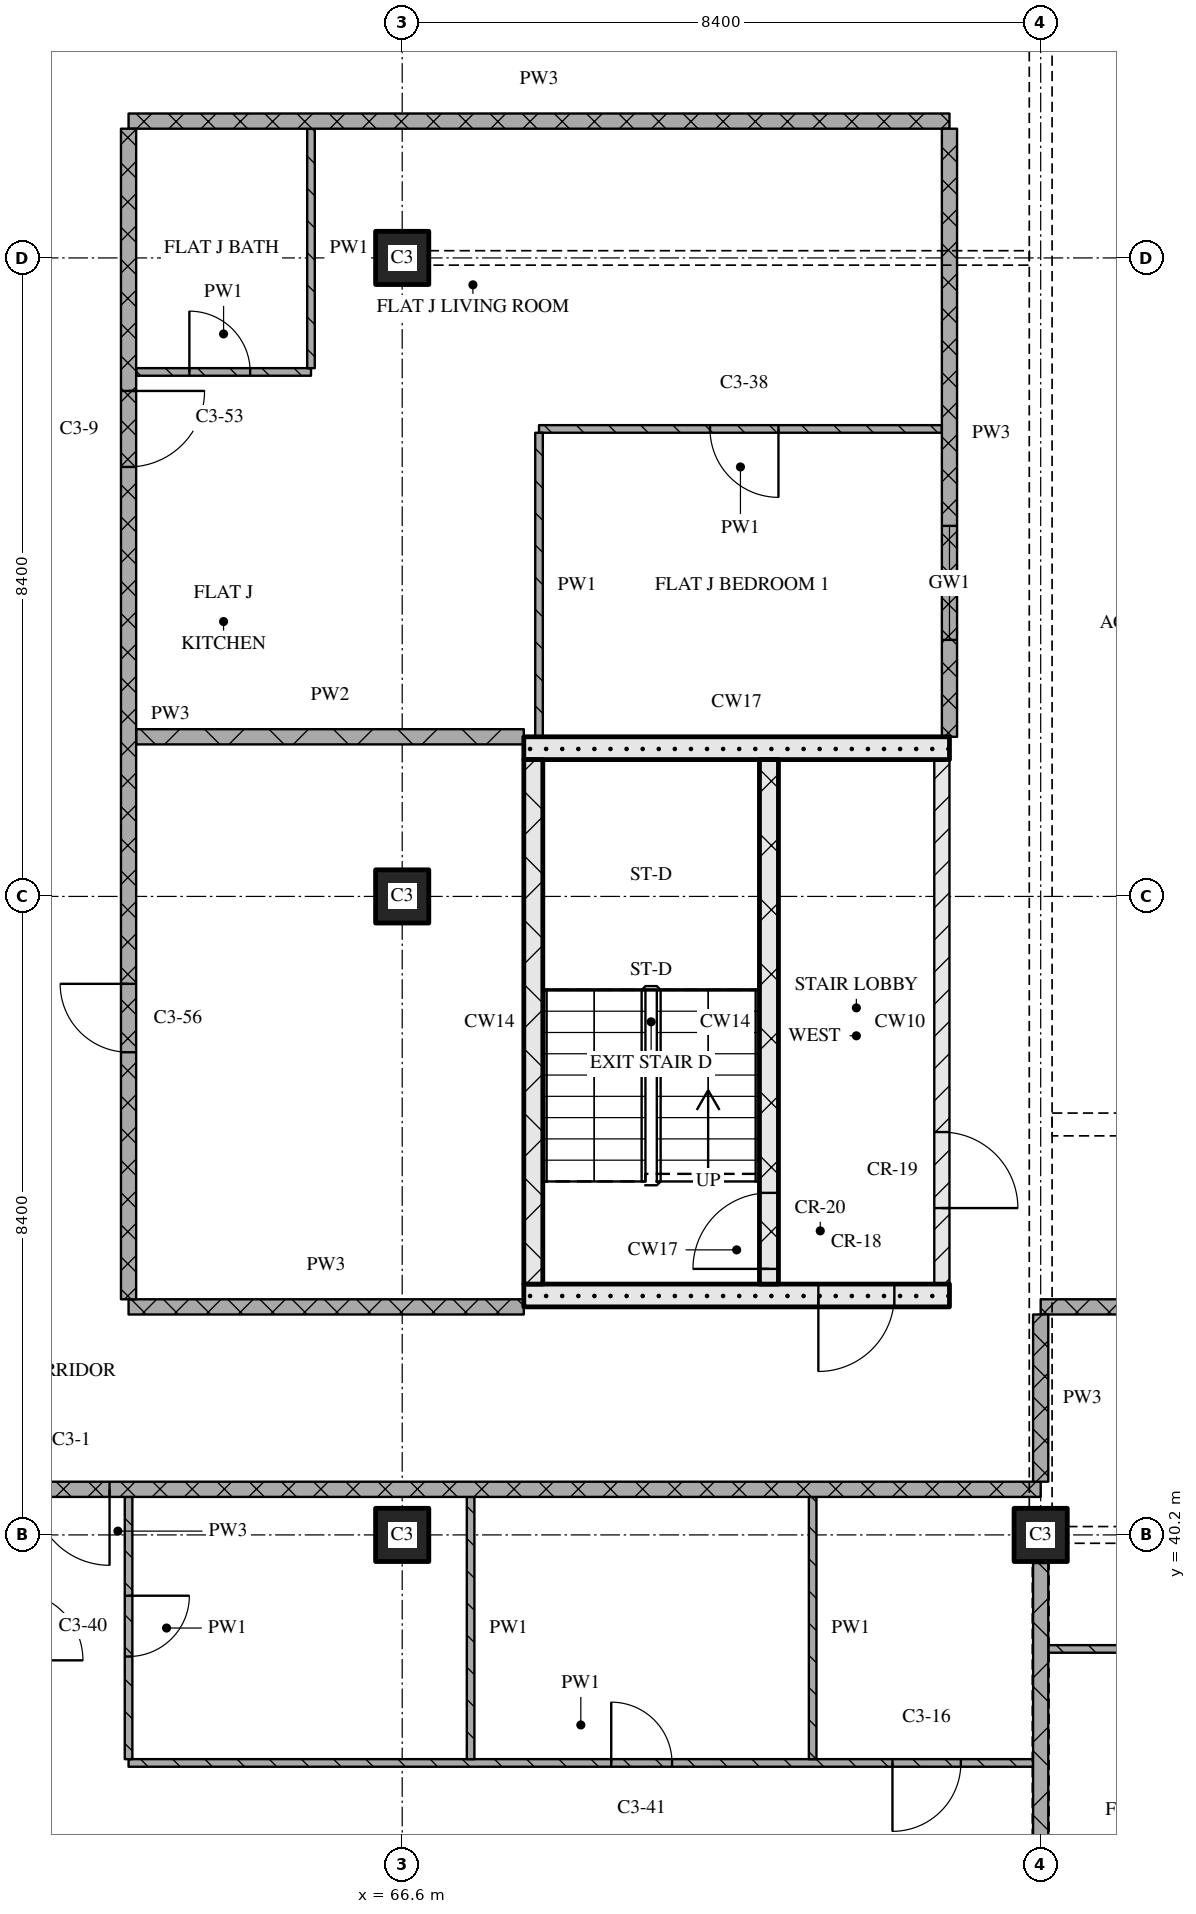
"""IFC4 building model, lengths in metres.
Left out: names, types, materials, properties, quantities, classifications, styles, units other than length and angle.
Written with IfcOpenShell. Run it as: python <this file> out.ifc"""

import sys

from ifc_helpers import new_model, si_unit, direction, frame, frame_2d, origin, origin_2d, place, context, subcontext, project, spatial, rectangle, extrude, element, fill, save


model = new_model("IFC4")
c1 = context("Model", 3, precision=1e-05, world=origin(), true_north=direction((0.0, 1.0)))
c2 = subcontext(c1, "Body", "Model", "MODEL_VIEW")
j1 = project(units=[si_unit("LENGTHUNIT", "METRE"), si_unit("PLANEANGLEUNIT", "RADIAN")], contexts=[c1])
p1 = place(None, origin())
s1 = spatial("IfcSite", under=j1, at=p1, CompositionType="ELEMENT")
p2 = place(p1, origin())
s2 = spatial("IfcBuilding", under=s1, at=p2, CompositionType="ELEMENT")
p3 = place(p2, frame((0.0, 0.0, 169.05)))
s3 = spatial("IfcBuildingStorey", under=s2, at=p3, CompositionType="ELEMENT", Elevation=169.05)
for number, where, z_axis, x_axis in (
    (1, (66.6, 40.2, 0.0), (0.0, 0.0, 1.0), (1.0, 0.0, 0.0)),
    (2, (66.6, 48.6, 0.0), (0.0, 0.0, 1.0), (1.0, 0.0, 0.0)),
    (3, (66.6, 57.0, 0.0), (0.0, 0.0, 1.0), (1.0, 0.0, 0.0)),
    (4, (75.0, 40.2, 0.0), (0.0, 0.0, 1.0), (1.0, 0.0, 0.0)),
):
    element("IfcColumn", number, at=place(p3, frame(where, z_axis=z_axis, x_axis=x_axis)), inside=s3, PredefinedType="COLUMN", context=c2, shape_type="SweptSolid", body=[
        extrude(rectangle(XDim=0.7, YDim=0.7, at=origin_2d()), origin(), (0.0, 0.0, 1.0), 3.6),
    ])
p4 = place(p3, frame((68.2, 43.35, 0.0), z_axis=(0.0, 0.0, 1.0), x_axis=(1.0, 0.0, 0.0)))
e5 = element("IfcWall", 5, at=p4, inside=s3, PredefinedType="SOLIDWALL", context=c2, shape_type="SweptSolid", body=[
    extrude(rectangle(XDim=5.6, YDim=0.3, at=frame_2d((2.8, 0.0))), origin(), (0.0, 0.0, 1.0), 3.32),
])
p5 = place(p4, frame((3.875, 0.0, 0.0)))
e6 = element("IfcOpeningElement", 6, at=p5, cuts=e5, PredefinedType="OPENING", context=c2, shape_type="SweptSolid", body=[
    extrude(rectangle(XDim=1.0, YDim=2.1, at=frame_2d((0.5, 1.05))), frame((0.0, 0.16, 0.0), z_axis=(0.0, -1.0, 0.0), x_axis=(1.0, 0.0, 0.0)), (0.0, 0.0, 1.0), 0.32),
])
p6 = place(p3, frame((68.325, 43.5, 0.0), z_axis=(0.0, 0.0, 1.0), x_axis=(0.0, 1.0, 0.0)))
e7 = element("IfcWall", 7, at=p6, inside=s3, PredefinedType="SOLIDWALL", context=c2, shape_type="SweptSolid", body=[
    extrude(rectangle(XDim=6.9, YDim=0.25, at=frame_2d((3.45, 0.0))), origin(), (0.0, 0.0, 1.0), 3.32),
])
p7 = place(p3, frame((71.425, 43.5, 0.0), z_axis=(0.0, 0.0, 1.0), x_axis=(0.0, 1.0, 0.0)))
e8 = element("IfcWall", 8, at=p7, inside=s3, PredefinedType="SOLIDWALL", context=c2, shape_type="SweptSolid", body=[
    extrude(rectangle(XDim=6.9, YDim=0.25, at=frame_2d((3.45, 0.0))), origin(), (0.0, 0.0, 1.0), 3.32),
])
p8 = place(p7, frame((0.2, 0.0, 0.0)))
e9 = element("IfcOpeningElement", 9, at=p8, cuts=e8, PredefinedType="OPENING", context=c2, shape_type="SweptSolid", body=[
    extrude(rectangle(XDim=1.0, YDim=2.1, at=frame_2d((0.5, 1.05))), frame((0.0, 0.135, 0.0), z_axis=(0.0, -1.0, 0.0), x_axis=(1.0, 0.0, 0.0)), (0.0, 0.0, 1.0), 0.27),
])
p9 = place(p3, frame((73.7, 43.5, 0.0), z_axis=(0.0, 0.0, 1.0), x_axis=(0.0, 1.0, 0.0)))
e10 = element("IfcWall", 10, at=p9, inside=s3, PredefinedType="PARTITIONING", context=c2, shape_type="SweptSolid", body=[
    extrude(rectangle(XDim=6.9, YDim=0.2, at=frame_2d((3.45, 0.0))), origin(), (0.0, 0.0, 1.0), 3.32),
])
p10 = place(p9, frame((1.0, 0.0, 0.0)))
e11 = element("IfcOpeningElement", 11, at=p10, cuts=e10, PredefinedType="OPENING", context=c2, shape_type="SweptSolid", body=[
    extrude(rectangle(XDim=1.0, YDim=2.1, at=frame_2d((0.5, 1.05))), frame((0.0, 0.11, 0.0), z_axis=(0.0, -1.0, 0.0), x_axis=(1.0, 0.0, 0.0)), (0.0, 0.0, 1.0), 0.22),
])
p11 = place(p3, frame((68.2, 50.55, 0.0), z_axis=(0.0, 0.0, 1.0), x_axis=(1.0, 0.0, 0.0)))
e12 = element("IfcWall", 12, at=p11, inside=s3, PredefinedType="SOLIDWALL", context=c2, shape_type="SweptSolid", body=[
    extrude(rectangle(XDim=5.6, YDim=0.3, at=frame_2d((2.8, 0.0))), origin(), (0.0, 0.0, 1.0), 3.32),
])
p12 = place(p3, frame((63.0, 37.2, 0.0), z_axis=(0.0, 0.0, 1.0), x_axis=(1.0, 0.0, 0.0)))
e13 = element("IfcWall", 13, at=p12, inside=s3, PredefinedType="PARTITIONING", context=c2, shape_type="SweptSolid", body=[
    extrude(rectangle(XDim=11.9, YDim=0.1, at=frame_2d((5.95, 0.0))), origin(), (0.0, 0.0, 1.0), 3.32),
])
p13 = place(p12, frame((6.35, 0.0, 0.0)))
e14 = element("IfcOpeningElement", 14, at=p13, cuts=e13, PredefinedType="OPENING", context=c2, shape_type="SweptSolid", body=[
    extrude(rectangle(XDim=0.8, YDim=2.1, at=frame_2d((0.4, 1.05))), frame((0.0, 0.06, 0.0), z_axis=(0.0, -1.0, 0.0), x_axis=(1.0, 0.0, 0.0)), (0.0, 0.0, 1.0), 0.12),
])
p14 = place(p12, frame((10.05, 0.0, 0.0)))
e15 = element("IfcOpeningElement", 15, at=p14, cuts=e13, PredefinedType="OPENING", context=c2, shape_type="SweptSolid", body=[
    extrude(rectangle(XDim=0.9, YDim=2.1, at=frame_2d((0.45, 1.05))), frame((0.0, 0.06, 0.0), z_axis=(0.0, -1.0, 0.0), x_axis=(1.0, 0.0, 0.0)), (0.0, 0.0, 1.0), 0.12),
])
p15 = place(p3, frame((75.1, 38.7, 0.0), z_axis=(0.0, 0.0, 1.0), x_axis=(1.0, 0.0, 0.0)))
e16 = element("IfcWall", 16, at=p15, inside=s3, PredefinedType="PARTITIONING", context=c2, shape_type="SweptSolid", body=[
    extrude(rectangle(XDim=6.8, YDim=0.1, at=frame_2d((3.4, 0.0))), origin(), (0.0, 0.0, 1.0), 3.32),
])
p16 = place(p15, frame((1.75, 0.0, 0.0)))
e17 = element("IfcOpeningElement", 17, at=p16, cuts=e16, PredefinedType="OPENING", context=c2, shape_type="SweptSolid", body=[
    extrude(rectangle(XDim=0.8, YDim=2.1, at=frame_2d((0.4, 1.05))), frame((0.0, 0.06, 0.0), z_axis=(0.0, -1.0, 0.0), x_axis=(1.0, 0.0, 0.0)), (0.0, 0.0, 1.0), 0.12),
])
p17 = place(p15, frame((5.2, 0.0, 0.0)))
e18 = element("IfcOpeningElement", 18, at=p17, cuts=e16, PredefinedType="OPENING", context=c2, shape_type="SweptSolid", body=[
    extrude(rectangle(XDim=0.8, YDim=2.1, at=frame_2d((0.4, 1.05))), frame((0.0, 0.06, 0.0), z_axis=(0.0, -1.0, 0.0), x_axis=(1.0, 0.0, 0.0)), (0.0, 0.0, 1.0), 0.12),
])
p18 = place(p3, frame((75.0, 40.8, 0.0), z_axis=(0.0, 0.0, 1.0), x_axis=(-1.0, 0.0, 0.0)))
e19 = element("IfcWall", 19, at=p18, inside=s3, PredefinedType="PARTITIONING", context=c2, shape_type="SweptSolid", body=[
    extrude(rectangle(XDim=24.28, YDim=0.2, at=frame_2d((12.14, 0.0))), origin(), (0.0, 0.0, 1.0), 3.32),
])
p19 = place(p18, frame((12.25, 0.0, 0.0)))
e20 = element("IfcOpeningElement", 20, at=p19, cuts=e19, PredefinedType="OPENING", context=c2, shape_type="SweptSolid", body=[
    extrude(rectangle(XDim=1.0, YDim=2.1, at=frame_2d((0.5, 1.05))), frame((0.0, 0.11, 0.0), z_axis=(0.0, -1.0, 0.0), x_axis=(1.0, 0.0, 0.0)), (0.0, 0.0, 1.0), 0.22),
])
p20 = place(p3, frame((63.0, 43.2, 0.0), z_axis=(0.0, 0.0, 1.0), x_axis=(1.0, 0.0, 0.0)))
e21 = element("IfcWall", 21, at=p20, inside=s3, PredefinedType="PARTITIONING", context=c2, shape_type="SweptSolid", body=[
    extrude(rectangle(XDim=5.2, YDim=0.2, at=frame_2d((2.6, 0.0))), origin(), (0.0, 0.0, 1.0), 3.32),
])
p21 = place(p3, frame((100.2, 43.2, 0.0), z_axis=(0.0, 0.0, 1.0), x_axis=(-1.0, 0.0, 0.0)))
e22 = element("IfcWall", 22, at=p21, inside=s3, PredefinedType="PARTITIONING", context=c2, shape_type="SweptSolid", body=[
    extrude(rectangle(XDim=25.2, YDim=0.2, at=frame_2d((12.6, 0.0))), origin(), (0.0, 0.0, 1.0), 3.32),
])
p22 = place(p21, frame((4.45, 0.0, 0.0)))
e23 = element("IfcOpeningElement", 23, at=p22, cuts=e22, PredefinedType="OPENING", context=c2, shape_type="SweptSolid", body=[
    extrude(rectangle(XDim=1.0, YDim=2.1, at=frame_2d((0.5, 1.05))), frame((0.0, 0.11, 0.0), z_axis=(0.0, -1.0, 0.0), x_axis=(1.0, 0.0, 0.0)), (0.0, 0.0, 1.0), 0.22),
])
p23 = place(p21, frame((17.05, 0.0, 0.0)))
e24 = element("IfcOpeningElement", 24, at=p23, cuts=e22, PredefinedType="OPENING", context=c2, shape_type="SweptSolid", body=[
    extrude(rectangle(XDim=1.0, YDim=2.1, at=frame_2d((0.5, 1.05))), frame((0.0, 0.11, 0.0), z_axis=(0.0, -1.0, 0.0), x_axis=(1.0, 0.0, 0.0)), (0.0, 0.0, 1.0), 0.22),
])
p24 = place(p3, frame((63.1, 50.7, 0.0), z_axis=(0.0, 0.0, 1.0), x_axis=(1.0, 0.0, 0.0)))
e25 = element("IfcWall", 25, at=p24, inside=s3, PredefinedType="PARTITIONING", context=c2, shape_type="SweptSolid", body=[
    extrude(rectangle(XDim=5.1, YDim=0.2, at=frame_2d((2.55, 0.0))), origin(), (0.0, 0.0, 1.0), 3.32),
])
p25 = place(p3, frame((73.7, 54.75, 0.0), z_axis=(0.0, 0.0, 1.0), x_axis=(-1.0, 0.0, 0.0)))
e26 = element("IfcWall", 26, at=p25, inside=s3, PredefinedType="PARTITIONING", context=c2, shape_type="SweptSolid", body=[
    extrude(rectangle(XDim=5.3, YDim=0.1, at=frame_2d((2.65, 0.0))), origin(), (0.0, 0.0, 1.0), 3.32),
])
p26 = place(p25, frame((2.15, 0.0, 0.0)))
e27 = element("IfcOpeningElement", 27, at=p26, cuts=e26, PredefinedType="OPENING", context=c2, shape_type="SweptSolid", body=[
    extrude(rectangle(XDim=0.9, YDim=2.1, at=frame_2d((0.45, 1.05))), frame((0.0, 0.06, 0.0), z_axis=(0.0, -1.0, 0.0), x_axis=(1.0, 0.0, 0.0)), (0.0, 0.0, 1.0), 0.12),
])
p27 = place(p3, frame((63.1, 55.5, 0.0), z_axis=(0.0, 0.0, 1.0), x_axis=(1.0, 0.0, 0.0)))
e28 = element("IfcWall", 28, at=p27, inside=s3, PredefinedType="PARTITIONING", context=c2, shape_type="SweptSolid", body=[
    extrude(rectangle(XDim=2.3, YDim=0.1, at=frame_2d((1.15, 0.0))), origin(), (0.0, 0.0, 1.0), 3.32),
])
p28 = place(p27, frame((0.7, 0.0, 0.0)))
e29 = element("IfcOpeningElement", 29, at=p28, cuts=e28, PredefinedType="OPENING", context=c2, shape_type="SweptSolid", body=[
    extrude(rectangle(XDim=0.8, YDim=2.1, at=frame_2d((0.4, 1.05))), frame((0.0, 0.06, 0.0), z_axis=(0.0, -1.0, 0.0), x_axis=(1.0, 0.0, 0.0)), (0.0, 0.0, 1.0), 0.12),
])
p29 = place(p3, frame((63.0, 58.8, 0.0), z_axis=(0.0, 0.0, 1.0), x_axis=(1.0, 0.0, 0.0)))
e30 = element("IfcWall", 30, at=p29, inside=s3, PredefinedType="PARTITIONING", context=c2, shape_type="SweptSolid", body=[
    extrude(rectangle(XDim=10.8, YDim=0.2, at=frame_2d((5.4, 0.0))), origin(), (0.0, 0.0, 1.0), 3.32),
])
p30 = place(p3, frame((63.0, 58.7, 0.0), z_axis=(0.0, 0.0, 1.0), x_axis=(0.0, -1.0, 0.0)))
e31 = element("IfcWall", 31, at=p30, inside=s3, PredefinedType="PARTITIONING", context=c2, shape_type="SweptSolid", body=[
    extrude(rectangle(XDim=15.4, YDim=0.2, at=frame_2d((7.7, 0.0))), origin(), (0.0, 0.0, 1.0), 3.32),
])
p31 = place(p30, frame((3.45, 0.0, 0.0)))
e32 = element("IfcOpeningElement", 32, at=p31, cuts=e31, PredefinedType="OPENING", context=c2, shape_type="SweptSolid", body=[
    extrude(rectangle(XDim=1.0, YDim=2.1, at=frame_2d((0.5, 1.05))), frame((0.0, 0.11, 0.0), z_axis=(0.0, -1.0, 0.0), x_axis=(1.0, 0.0, 0.0)), (0.0, 0.0, 1.0), 0.22),
])
p32 = place(p30, frame((11.25, 0.0, 0.0)))
e33 = element("IfcOpeningElement", 33, at=p32, cuts=e31, PredefinedType="OPENING", context=c2, shape_type="SweptSolid", body=[
    extrude(rectangle(XDim=0.9, YDim=2.1, at=frame_2d((0.45, 1.05))), frame((0.0, 0.11, 0.0), z_axis=(0.0, -1.0, 0.0), x_axis=(1.0, 0.0, 0.0)), (0.0, 0.0, 1.0), 0.22),
])
p33 = place(p3, frame((63.0, 40.7, 0.0), z_axis=(0.0, 0.0, 1.0), x_axis=(0.0, -1.0, 0.0)))
e34 = element("IfcWall", 34, at=p33, inside=s3, PredefinedType="PARTITIONING", context=c2, shape_type="SweptSolid", body=[
    extrude(rectangle(XDim=3.45, YDim=0.1, at=frame_2d((1.725, 0.0))), origin(), (0.0, 0.0, 1.0), 3.32),
])
p34 = place(p33, frame((1.3, 0.0, 0.0)))
e35 = element("IfcOpeningElement", 35, at=p34, cuts=e34, PredefinedType="OPENING", context=c2, shape_type="SweptSolid", body=[
    extrude(rectangle(XDim=0.8, YDim=2.1, at=frame_2d((0.4, 1.05))), frame((0.0, 0.06, 0.0), z_axis=(0.0, -1.0, 0.0), x_axis=(1.0, 0.0, 0.0)), (0.0, 0.0, 1.0), 0.12),
])
p35 = place(p3, frame((65.4, 58.7, 0.0), z_axis=(0.0, 0.0, 1.0), x_axis=(0.0, -1.0, 0.0)))
e36 = element("IfcWall", 36, at=p35, inside=s3, PredefinedType="PARTITIONING", context=c2, shape_type="SweptSolid", body=[
    extrude(rectangle(XDim=3.15, YDim=0.1, at=frame_2d((1.575, 0.0))), origin(), (0.0, 0.0, 1.0), 3.32),
])
p36 = place(p3, frame((67.5, 40.7, 0.0), z_axis=(0.0, 0.0, 1.0), x_axis=(0.0, -1.0, 0.0)))
e37 = element("IfcWall", 37, at=p36, inside=s3, PredefinedType="PARTITIONING", context=c2, shape_type="SweptSolid", body=[
    extrude(rectangle(XDim=3.45, YDim=0.1, at=frame_2d((1.725, 0.0))), origin(), (0.0, 0.0, 1.0), 3.32),
])
p37 = place(p3, frame((68.4, 54.7, 0.0), z_axis=(0.0, 0.0, 1.0), x_axis=(0.0, -1.0, 0.0)))
e38 = element("IfcWall", 38, at=p37, inside=s3, PredefinedType="PARTITIONING", context=c2, shape_type="SweptSolid", body=[
    extrude(rectangle(XDim=4.0, YDim=0.1, at=frame_2d((2.0, 0.0))), origin(), (0.0, 0.0, 1.0), 3.32),
])
p38 = place(p3, frame((72.0, 40.7, 0.0), z_axis=(0.0, 0.0, 1.0), x_axis=(0.0, -1.0, 0.0)))
e39 = element("IfcWall", 39, at=p38, inside=s3, PredefinedType="PARTITIONING", context=c2, shape_type="SweptSolid", body=[
    extrude(rectangle(XDim=3.45, YDim=0.1, at=frame_2d((1.725, 0.0))), origin(), (0.0, 0.0, 1.0), 3.32),
])
p39 = place(p3, frame((73.8, 58.7, 0.0), z_axis=(0.0, 0.0, 1.0), x_axis=(0.0, -1.0, 0.0)))
e40 = element("IfcWall", 40, at=p39, inside=s3, PredefinedType="PARTITIONING", context=c2, shape_type="SweptSolid", body=[
    extrude(rectangle(XDim=8.0, YDim=0.2, at=frame_2d((4.0, 0.0))), origin(), (0.0, 0.0, 1.0), 3.32),
])
p40 = place(p39, frame((5.225, 0.0, 0.9)))
e41 = element("IfcOpeningElement", 41, at=p40, cuts=e40, PredefinedType="OPENING", context=c2, shape_type="SweptSolid", body=[
    extrude(rectangle(XDim=1.5, YDim=1.5, at=frame_2d((0.75, 0.75))), frame((0.0, 0.11, 0.0), z_axis=(0.0, -1.0, 0.0), x_axis=(1.0, 0.0, 0.0)), (0.0, 0.0, 1.0), 0.22),
])
p41 = place(p3, frame((75.0, 43.1, 0.0), z_axis=(0.0, 0.0, 1.0), x_axis=(0.0, -1.0, 0.0)))
e42 = element("IfcWall", 42, at=p41, inside=s3, PredefinedType="PARTITIONING", context=c2, shape_type="SweptSolid", body=[
    extrude(rectangle(XDim=2.2, YDim=0.2, at=frame_2d((1.1, 0.0))), origin(), (0.0, 0.0, 1.0), 2.43),
])
p42 = place(p3, frame((75.0, 39.83, 0.0), z_axis=(0.0, 0.0, 1.0), x_axis=(0.0, -1.0, 0.0)))
e43 = element("IfcWall", 43, at=p42, inside=s3, PredefinedType="PARTITIONING", context=c2, shape_type="SweptSolid", body=[
    extrude(rectangle(XDim=7.66, YDim=0.2, at=frame_2d((3.83, 0.0))), origin(), (0.0, 0.0, 1.0), 2.72),
])
p43 = place(p5, origin())
e44 = element("IfcDoor", 44, at=p43, inside=s3, OperationType="SINGLE_SWING_RIGHT", PredefinedType="DOOR", context=c2, shape_type="SweptSolid", body=[
    extrude(rectangle(XDim=1.0, YDim=2.1, at=frame_2d((0.5, 1.05))), frame((0.0, 0.025, 0.0), z_axis=(0.0, -1.0, 0.0), x_axis=(1.0, 0.0, 0.0)), (0.0, 0.0, 1.0), 0.05),
])
fill(e6, e44)
p44 = place(p8, origin())
e45 = element("IfcDoor", 45, at=p44, inside=s3, OperationType="SINGLE_SWING_LEFT", PredefinedType="DOOR", context=c2, shape_type="SweptSolid", body=[
    extrude(rectangle(XDim=1.0, YDim=2.1, at=frame_2d((0.5, 1.05))), frame((0.0, 0.025, 0.0), z_axis=(0.0, -1.0, 0.0), x_axis=(1.0, 0.0, 0.0)), (0.0, 0.0, 1.0), 0.05),
])
fill(e9, e45)
p45 = place(p10, origin())
e46 = element("IfcDoor", 46, at=p45, inside=s3, OperationType="SINGLE_SWING_RIGHT", PredefinedType="DOOR", context=c2, shape_type="SweptSolid", body=[
    extrude(rectangle(XDim=1.0, YDim=2.1, at=frame_2d((0.5, 1.05))), frame((0.0, 0.025, 0.0), z_axis=(0.0, -1.0, 0.0), x_axis=(1.0, 0.0, 0.0)), (0.0, 0.0, 1.0), 0.05),
])
fill(e11, e46)
p46 = place(p13, origin())
e47 = element("IfcDoor", 47, at=p46, inside=s3, OperationType="SINGLE_SWING_LEFT", PredefinedType="DOOR", context=c2, shape_type="SweptSolid", body=[
    extrude(rectangle(XDim=0.8, YDim=2.1, at=frame_2d((0.4, 1.05))), frame((0.0, 0.025, 0.0), z_axis=(0.0, -1.0, 0.0), x_axis=(1.0, 0.0, 0.0)), (0.0, 0.0, 1.0), 0.05),
])
fill(e14, e47)
p47 = place(p14, origin())
e48 = element("IfcDoor", 48, at=p47, inside=s3, OperationType="SINGLE_SWING_RIGHT", PredefinedType="DOOR", context=c2, shape_type="SweptSolid", body=[
    extrude(rectangle(XDim=0.9, YDim=2.1, at=frame_2d((0.45, 1.05))), frame((0.0, 0.025, 0.0), z_axis=(0.0, -1.0, 0.0), x_axis=(1.0, 0.0, 0.0)), (0.0, 0.0, 1.0), 0.05),
])
fill(e15, e48)
p48 = place(p19, origin())
e49 = element("IfcDoor", 49, at=p48, inside=s3, OperationType="SINGLE_SWING_LEFT", PredefinedType="DOOR", context=c2, shape_type="SweptSolid", body=[
    extrude(rectangle(XDim=1.0, YDim=2.1, at=frame_2d((0.5, 1.05))), frame((0.0, 0.025, 0.0), z_axis=(0.0, -1.0, 0.0), x_axis=(1.0, 0.0, 0.0)), (0.0, 0.0, 1.0), 0.05),
])
fill(e20, e49)
p49 = place(p26, origin())
e50 = element("IfcDoor", 50, at=p49, inside=s3, OperationType="SINGLE_SWING_LEFT", PredefinedType="DOOR", context=c2, shape_type="SweptSolid", body=[
    extrude(rectangle(XDim=0.9, YDim=2.1, at=frame_2d((0.45, 1.05))), frame((0.0, 0.025, 0.0), z_axis=(0.0, -1.0, 0.0), x_axis=(1.0, 0.0, 0.0)), (0.0, 0.0, 1.0), 0.05),
])
fill(e27, e50)
p50 = place(p28, origin())
e51 = element("IfcDoor", 51, at=p50, inside=s3, OperationType="SINGLE_SWING_LEFT", PredefinedType="DOOR", context=c2, shape_type="SweptSolid", body=[
    extrude(rectangle(XDim=0.8, YDim=2.1, at=frame_2d((0.4, 1.05))), frame((0.0, 0.025, 0.0), z_axis=(0.0, -1.0, 0.0), x_axis=(1.0, 0.0, 0.0)), (0.0, 0.0, 1.0), 0.05),
])
fill(e29, e51)
p51 = place(p31, origin())
e52 = element("IfcDoor", 52, at=p51, inside=s3, OperationType="SINGLE_SWING_LEFT", PredefinedType="DOOR", context=c2, shape_type="SweptSolid", body=[
    extrude(rectangle(XDim=1.0, YDim=2.1, at=frame_2d((0.5, 1.05))), frame((0.0, 0.025, 0.0), z_axis=(0.0, -1.0, 0.0), x_axis=(1.0, 0.0, 0.0)), (0.0, 0.0, 1.0), 0.05),
])
fill(e32, e52)
p52 = place(p32, origin())
e53 = element("IfcDoor", 53, at=p52, inside=s3, OperationType="SINGLE_SWING_RIGHT", PredefinedType="DOOR", context=c2, shape_type="SweptSolid", body=[
    extrude(rectangle(XDim=0.9, YDim=2.1, at=frame_2d((0.45, 1.05))), frame((0.0, 0.025, 0.0), z_axis=(0.0, -1.0, 0.0), x_axis=(1.0, 0.0, 0.0)), (0.0, 0.0, 1.0), 0.05),
])
fill(e33, e53)
p53 = place(p34, origin())
e54 = element("IfcDoor", 54, at=p53, inside=s3, OperationType="SINGLE_SWING_LEFT", PredefinedType="DOOR", context=c2, shape_type="SweptSolid", body=[
    extrude(rectangle(XDim=0.8, YDim=2.1, at=frame_2d((0.4, 1.05))), frame((0.0, 0.025, 0.0), z_axis=(0.0, -1.0, 0.0), x_axis=(1.0, 0.0, 0.0)), (0.0, 0.0, 1.0), 0.05),
])
fill(e35, e54)
p54 = place(p40, origin())
e55 = element("IfcWindow", 55, at=p54, inside=s3, PartitioningType="SINGLE_PANEL", PredefinedType="WINDOW", context=c2, shape_type="SweptSolid", body=[
    extrude(rectangle(XDim=1.5, YDim=1.5, at=frame_2d((0.75, 0.75))), frame((0.0, 0.03, 0.0), z_axis=(0.0, -1.0, 0.0), x_axis=(1.0, 0.0, 0.0)), (0.0, 0.0, 1.0), 0.06),
])
fill(e41, e55)
save(model, sys.argv[1])
